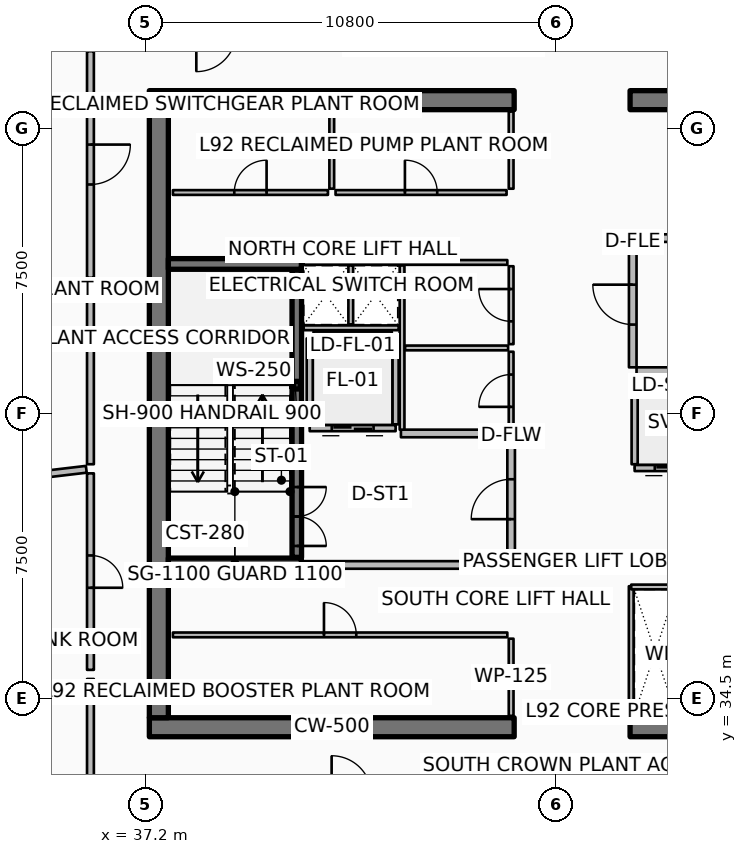
"""IFC4 building model, lengths in metres.
Left out: names, types, materials, properties, quantities, classifications, styles, units other than length and angle.
Written with IfcOpenShell. Run it as: python <this file> out.ifc"""

import sys

from ifc_helpers import new_model, si_unit, direction, frame, frame_2d, origin, origin_2d, place, context, subcontext, project, spatial, rectangle, hollow_rectangle, extrude, element, fill, save


model = new_model("IFC4")
c1 = context("Model", 3, precision=1e-05, world=origin(), true_north=direction((0.0, 1.0)))
c2 = subcontext(c1, "Body", "Model", "MODEL_VIEW")
j1 = project(units=[si_unit("LENGTHUNIT", "METRE"), si_unit("PLANEANGLEUNIT", "RADIAN")], contexts=[c1])
p1 = place(None, origin())
s1 = spatial("IfcSite", under=j1, at=p1, CompositionType="ELEMENT")
p2 = place(p1, origin())
s2 = spatial("IfcBuilding", under=s1, at=p2, CompositionType="ELEMENT")
p3 = place(p2, frame((0.0, 0.0, 366.8)))
s3 = spatial("IfcBuildingStorey", under=s2, at=p3, CompositionType="ELEMENT", Elevation=366.8)
p4 = place(p3, frame((37.3, 33.75, 0.0), z_axis=(0.0, 0.0, 1.0), x_axis=(1.0, 0.0, 0.0)))
e1 = element("IfcWall", 1, at=p4, inside=s3, PredefinedType="SHEAR", context=c2, shape_type="SweptSolid", body=[
    extrude(rectangle(XDim=9.6, YDim=0.5, at=frame_2d((4.8, 0.0))), origin(), (0.0, 0.0, 1.0), 3.6),
])
p5 = place(p3, frame((49.95, 33.75, 0.0), z_axis=(0.0, 0.0, 1.0), x_axis=(1.0, 0.0, 0.0)))
e2 = element("IfcWall", 2, at=p5, inside=s3, PredefinedType="SHEAR", context=c2, shape_type="SweptSolid", body=[
    extrude(rectangle(XDim=9.6, YDim=0.5, at=frame_2d((4.8, 0.0))), origin(), (0.0, 0.0, 1.0), 3.6),
])
p6 = place(p3, frame((37.3, 50.25, 0.0), z_axis=(0.0, 0.0, 1.0), x_axis=(1.0, 0.0, 0.0)))
e3 = element("IfcWall", 3, at=p6, inside=s3, PredefinedType="SHEAR", context=c2, shape_type="SweptSolid", body=[
    extrude(rectangle(XDim=9.6, YDim=0.5, at=frame_2d((4.8, 0.0))), origin(), (0.0, 0.0, 1.0), 3.6),
])
p7 = place(p3, frame((49.95, 50.25, 0.0), z_axis=(0.0, 0.0, 1.0), x_axis=(1.0, 0.0, 0.0)))
e4 = element("IfcWall", 4, at=p7, inside=s3, PredefinedType="SHEAR", context=c2, shape_type="SweptSolid", body=[
    extrude(rectangle(XDim=9.6, YDim=0.5, at=frame_2d((4.8, 0.0))), origin(), (0.0, 0.0, 1.0), 3.6),
])
p8 = place(p3, frame((37.55, 34.0, 0.0), z_axis=(0.0, 0.0, 1.0), x_axis=(0.0, 1.0, 0.0)))
e5 = element("IfcWall", 5, at=p8, inside=s3, PredefinedType="SHEAR", context=c2, shape_type="SweptSolid", body=[
    extrude(rectangle(XDim=16.0, YDim=0.5, at=frame_2d((8.0, 0.0))), origin(), (0.0, 0.0, 1.0), 3.6),
])
for number, where, z_axis, x_axis in (
    (6, (37.8, 38.06, 0.0), (0.0, 0.0, 1.0), (1.0, 0.0, 0.0)),
    (7, (37.8, 45.94, 0.0), (0.0, 0.0, 1.0), (1.0, 0.0, 0.0)),
):
    element("IfcWall", number, at=place(p3, frame(where, z_axis=z_axis, x_axis=x_axis)), inside=s3, PredefinedType="SHEAR", context=c2, shape_type="SweptSolid", body=[
        extrude(rectangle(XDim=3.5, YDim=0.28, at=frame_2d((1.75, 0.0))), origin(), (0.0, 0.0, 1.0), 3.6),
    ])
p9 = place(p3, frame((41.18, 42.75, 0.0), z_axis=(0.0, 0.0, 1.0), x_axis=(1.0, 0.0, 0.0)))
e8 = element("IfcColumn", 8, at=p9, inside=s3, PredefinedType="COLUMN", context=c2, shape_type="SweptSolid", body=[
    extrude(hollow_rectangle(XDim=0.2, YDim=0.2, WallThickness=0.01, InnerFilletRadius=0.01, OuterFilletRadius=0.02, at=origin_2d()), origin(), (0.0, 0.0, 1.0), 1.595),
])
p10 = place(p3, frame((41.18, 38.22, 0.0), z_axis=(0.0, 0.0, 1.0), x_axis=(0.0, 1.0, 0.0)))
e9 = element("IfcWall", 9, at=p10, inside=s3, PredefinedType="SOLIDWALL", context=c2, shape_type="SweptSolid", body=[
    extrude(rectangle(XDim=7.56, YDim=0.25, at=frame_2d((3.78, 0.0))), origin(), (0.0, 0.0, 1.0), 3.32),
])
p11 = place(p10, frame((0.3, 0.0, 0.0)))
e10 = element("IfcOpeningElement", 10, at=p11, cuts=e9, PredefinedType="OPENING", context=c2, shape_type="SweptSolid", body=[
    extrude(rectangle(XDim=1.55, YDim=2.15, at=frame_2d((0.775, 1.075))), frame((0.0, 0.135, 0.0), z_axis=(0.0, -1.0, 0.0), x_axis=(1.0, 0.0, 0.0)), (0.0, 0.0, 1.0), 0.27),
])
p12 = place(p3, frame((43.78, 41.62, 0.0), z_axis=(0.0, 0.0, 1.0), x_axis=(-1.0, 0.0, 0.0)))
e11 = element("IfcWall", 11, at=p12, inside=s3, PredefinedType="PARTITIONING", context=c2, shape_type="SweptSolid", body=[
    extrude(rectangle(XDim=2.26, YDim=0.16, at=frame_2d((1.13, 0.0))), origin(), (0.0, 0.0, 1.0), 3.32),
])
p13 = place(p12, frame((0.58, 0.0, 0.0)))
e12 = element("IfcOpeningElement", 12, at=p13, cuts=e11, PredefinedType="OPENING", context=c2, shape_type="SweptSolid", body=[
    extrude(rectangle(XDim=1.1, YDim=2.1, at=frame_2d((0.55, 1.05))), frame((0.0, 0.09, 0.0), z_axis=(0.0, -1.0, 0.0), x_axis=(1.0, 0.0, 0.0)), (0.0, 0.0, 1.0), 0.18),
])
for number, where, z_axis, x_axis in (
    (13, (43.78, 41.72, 0.0), (0.0, 0.0, 1.0), (0.0, 1.0, 0.0)),
    (14, (41.52, 41.72, 0.0), (0.0, 0.0, 1.0), (0.0, 1.0, 0.0)),
):
    element("IfcWall", number, at=place(p3, frame(where, z_axis=z_axis, x_axis=x_axis)), inside=s3, PredefinedType="PARTITIONING", context=c2, shape_type="SweptSolid", body=[
        extrude(rectangle(XDim=2.26, YDim=0.16, at=frame_2d((1.13, 0.0))), origin(), (0.0, 0.0, 1.0), 3.32),
    ])
p14 = place(p3, frame((41.62, 44.08, 0.0), z_axis=(0.0, 0.0, 1.0), x_axis=(1.0, 0.0, 0.0)))
e15 = element("IfcWall", 15, at=p14, inside=s3, PredefinedType="PARTITIONING", context=c2, shape_type="SweptSolid", body=[
    extrude(rectangle(XDim=2.06, YDim=0.16, at=frame_2d((1.03, 0.0))), origin(), (0.0, 0.0, 1.0), 3.32),
])
p15 = place(p3, frame((52.23, 40.57, 0.0), z_axis=(0.0, 0.0, 1.0), x_axis=(-1.0, 0.0, 0.0)))
e16 = element("IfcWall", 16, at=p15, inside=s3, PredefinedType="PARTITIONING", context=c2, shape_type="SweptSolid", body=[
    extrude(rectangle(XDim=2.16, YDim=0.16, at=frame_2d((1.08, 0.0))), origin(), (0.0, 0.0, 1.0), 3.32),
])
p16 = place(p15, frame((0.53, 0.0, 0.0)))
e17 = element("IfcOpeningElement", 17, at=p16, cuts=e16, PredefinedType="OPENING", context=c2, shape_type="SweptSolid", body=[
    extrude(rectangle(XDim=1.1, YDim=2.1, at=frame_2d((0.55, 1.05))), frame((0.0, 0.09, 0.0), z_axis=(0.0, -1.0, 0.0), x_axis=(1.0, 0.0, 0.0)), (0.0, 0.0, 1.0), 0.18),
])
p17 = place(p3, frame((50.07, 40.67, 0.0), z_axis=(0.0, 0.0, 1.0), x_axis=(0.0, 1.0, 0.0)))
e18 = element("IfcWall", 18, at=p17, inside=s3, PredefinedType="PARTITIONING", context=c2, shape_type="SweptSolid", body=[
    extrude(rectangle(XDim=2.16, YDim=0.16, at=frame_2d((1.08, 0.0))), origin(), (0.0, 0.0, 1.0), 3.32),
])
p18 = place(p3, frame((50.17, 42.93, 0.0), z_axis=(0.0, 0.0, 1.0), x_axis=(1.0, 0.0, 0.0)))
e19 = element("IfcWall", 19, at=p18, inside=s3, PredefinedType="PARTITIONING", context=c2, shape_type="SweptSolid", body=[
    extrude(rectangle(XDim=1.96, YDim=0.16, at=frame_2d((0.98, 0.0))), origin(), (0.0, 0.0, 1.0), 3.32),
])
p19 = place(p3, frame((46.82, 34.05, 0.0), z_axis=(0.0, 0.0, 1.0), x_axis=(0.0, 1.0, 0.0)))
e20 = element("IfcWall", 20, at=p19, inside=s3, PredefinedType="PARTITIONING", context=c2, shape_type="SweptSolid", body=[
    extrude(rectangle(XDim=2.03, YDim=0.125, at=frame_2d((1.015, 0.0))), origin(), (0.0, 0.0, 1.0), 2.76),
])
p20 = place(p3, frame((37.92, 36.18, 0.0), z_axis=(0.0, 0.0, 1.0), x_axis=(1.0, 0.0, 0.0)))
e21 = element("IfcWall", 21, at=p20, inside=s3, PredefinedType="PARTITIONING", context=c2, shape_type="SweptSolid", body=[
    extrude(rectangle(XDim=8.8, YDim=0.125, at=frame_2d((4.4, 0.0))), origin(), (0.0, 0.0, 1.0), 2.76),
])
p21 = place(p20, frame((3.975, 0.0, 0.0)))
e22 = element("IfcOpeningElement", 22, at=p21, cuts=e21, PredefinedType="OPENING", context=c2, shape_type="SweptSolid", body=[
    extrude(rectangle(XDim=0.85, YDim=2.06, at=frame_2d((0.425, 1.03))), frame((0.0, 0.073, 0.0), z_axis=(0.0, -1.0, 0.0), x_axis=(1.0, 0.0, 0.0)), (0.0, 0.0, 1.0), 0.145),
])
for number, where, z_axis, x_axis in (
    (23, (46.82, 47.92, 0.0), (0.0, 0.0, 1.0), (0.0, 1.0, 0.0)),
    (24, (42.1, 47.92, 0.0), (0.0, 0.0, 1.0), (0.0, 1.0, 0.0)),
):
    element("IfcWall", number, at=place(p3, frame(where, z_axis=z_axis, x_axis=x_axis)), inside=s3, PredefinedType="PARTITIONING", context=c2, shape_type="SweptSolid", body=[
        extrude(rectangle(XDim=2.03, YDim=0.125, at=frame_2d((1.015, 0.0))), origin(), (0.0, 0.0, 1.0), 2.76),
    ])
p22 = place(p3, frame((37.92, 47.82, 0.0), z_axis=(0.0, 0.0, 1.0), x_axis=(1.0, 0.0, 0.0)))
e25 = element("IfcWall", 25, at=p22, inside=s3, PredefinedType="PARTITIONING", context=c2, shape_type="SweptSolid", body=[
    extrude(rectangle(XDim=4.08, YDim=0.125, at=frame_2d((2.04, 0.0))), origin(), (0.0, 0.0, 1.0), 2.76),
])
p23 = place(p22, frame((1.615, 0.0, 0.0)))
e26 = element("IfcOpeningElement", 26, at=p23, cuts=e25, PredefinedType="OPENING", context=c2, shape_type="SweptSolid", body=[
    extrude(rectangle(XDim=0.85, YDim=2.06, at=frame_2d((0.425, 1.03))), frame((0.0, 0.073, 0.0), z_axis=(0.0, -1.0, 0.0), x_axis=(1.0, 0.0, 0.0)), (0.0, 0.0, 1.0), 0.145),
])
p24 = place(p3, frame((42.2, 47.82, 0.0), z_axis=(0.0, 0.0, 1.0), x_axis=(1.0, 0.0, 0.0)))
e27 = element("IfcWall", 27, at=p24, inside=s3, PredefinedType="PARTITIONING", context=c2, shape_type="SweptSolid", body=[
    extrude(rectangle(XDim=4.5, YDim=0.125, at=frame_2d((2.25, 0.0))), origin(), (0.0, 0.0, 1.0), 2.76),
])
p25 = place(p24, frame((1.825, 0.0, 0.0)))
e28 = element("IfcOpeningElement", 28, at=p25, cuts=e27, PredefinedType="OPENING", context=c2, shape_type="SweptSolid", body=[
    extrude(rectangle(XDim=0.85, YDim=2.06, at=frame_2d((0.425, 1.03))), frame((0.0, 0.073, 0.0), z_axis=(0.0, -1.0, 0.0), x_axis=(1.0, 0.0, 0.0)), (0.0, 0.0, 1.0), 0.145),
])
p26 = place(p3, frame((41.35, 38.02, 0.0), z_axis=(0.0, 0.0, 1.0), x_axis=(1.0, 0.0, 0.0)))
e29 = element("IfcWall", 29, at=p26, inside=s3, PredefinedType="PARTITIONING", context=c2, shape_type="SweptSolid", body=[
    extrude(rectangle(XDim=5.37, YDim=0.2, at=frame_2d((2.685, 0.0))), origin(), (0.0, 0.0, 1.0), 3.32),
])
p27 = place(p3, frame((43.92, 41.48, 0.0), z_axis=(0.0, 0.0, 1.0), x_axis=(1.0, 0.0, 0.0)))
e30 = element("IfcWall", 30, at=p27, inside=s3, PredefinedType="PARTITIONING", context=c2, shape_type="SweptSolid", body=[
    extrude(rectangle(XDim=2.8, YDim=0.2, at=frame_2d((1.4, 0.0))), origin(), (0.0, 0.0, 1.0), 3.32),
])
p28 = place(p3, frame((46.82, 38.12, 0.0), z_axis=(0.0, 0.0, 1.0), x_axis=(0.0, 1.0, 0.0)))
e31 = element("IfcWall", 31, at=p28, inside=s3, PredefinedType="PARTITIONING", context=c2, shape_type="SweptSolid", body=[
    extrude(rectangle(XDim=3.26, YDim=0.2, at=frame_2d((1.63, 0.0))), origin(), (0.0, 0.0, 1.0), 3.32),
])
p29 = place(p28, frame((1.105, 0.0, 0.0)))
e32 = element("IfcOpeningElement", 32, at=p29, cuts=e31, PredefinedType="OPENING", context=c2, shape_type="SweptSolid", body=[
    extrude(rectangle(XDim=1.05, YDim=2.1, at=frame_2d((0.525, 1.05))), frame((0.0, 0.11, 0.0), z_axis=(0.0, -1.0, 0.0), x_axis=(1.0, 0.0, 0.0)), (0.0, 0.0, 1.0), 0.22),
])
p30 = place(p3, frame((50.12, 43.12, 0.0), z_axis=(0.0, 0.0, 1.0), x_axis=(1.0, 0.0, 0.0)))
e33 = element("IfcWall", 33, at=p30, inside=s3, PredefinedType="PARTITIONING", context=c2, shape_type="SweptSolid", body=[
    extrude(rectangle(XDim=8.88, YDim=0.2, at=frame_2d((4.44, 0.0))), origin(), (0.0, 0.0, 1.0), 3.32),
])
p31 = place(p3, frame((50.14, 46.62, 0.0), z_axis=(0.0, 0.0, 1.0), x_axis=(1.0, 0.0, 0.0)))
e34 = element("IfcWall", 34, at=p31, inside=s3, PredefinedType="PARTITIONING", context=c2, shape_type="SweptSolid", body=[
    extrude(rectangle(XDim=1.02, YDim=0.2, at=frame_2d((0.51, 0.0))), origin(), (0.0, 0.0, 1.0), 3.32),
])
p32 = place(p3, frame((50.02, 43.22, 0.0), z_axis=(0.0, 0.0, 1.0), x_axis=(0.0, 1.0, 0.0)))
e35 = element("IfcWall", 35, at=p32, inside=s3, PredefinedType="PARTITIONING", context=c2, shape_type="SweptSolid", body=[
    extrude(rectangle(XDim=3.3, YDim=0.2, at=frame_2d((1.65, 0.0))), origin(), (0.0, 0.0, 1.0), 3.32),
])
p33 = place(p32, frame((1.125, 0.0, 0.0)))
e36 = element("IfcOpeningElement", 36, at=p33, cuts=e35, PredefinedType="OPENING", context=c2, shape_type="SweptSolid", body=[
    extrude(rectangle(XDim=1.05, YDim=2.1, at=frame_2d((0.525, 1.05))), frame((0.0, 0.11, 0.0), z_axis=(0.0, -1.0, 0.0), x_axis=(1.0, 0.0, 0.0)), (0.0, 0.0, 1.0), 0.22),
])
p34 = place(p3, frame((41.36, 45.98, 0.0), z_axis=(0.0, 0.0, 1.0), x_axis=(1.0, 0.0, 0.0)))
e37 = element("IfcWall", 37, at=p34, inside=s3, PredefinedType="PARTITIONING", context=c2, shape_type="SweptSolid", body=[
    extrude(rectangle(XDim=5.36, YDim=0.125, at=frame_2d((2.68, 0.0))), origin(), (0.0, 0.0, 1.0), 2.76),
])
p35 = place(p3, frame((41.36, 44.26, 0.0), z_axis=(0.0, 0.0, 1.0), x_axis=(1.0, 0.0, 0.0)))
e38 = element("IfcWall", 38, at=p35, inside=s3, PredefinedType="PARTITIONING", context=c2, shape_type="SweptSolid", body=[
    extrude(rectangle(XDim=2.5, YDim=0.125, at=frame_2d((1.25, 0.0))), origin(), (0.0, 0.0, 1.0), 2.76),
])
p36 = place(p3, frame((42.6, 44.35, 0.0), z_axis=(0.0, 0.0, 1.0), x_axis=(0.0, 1.0, 0.0)))
e39 = element("IfcWall", 39, at=p36, inside=s3, PredefinedType="PARTITIONING", context=c2, shape_type="SweptSolid", body=[
    extrude(rectangle(XDim=1.55, YDim=0.125, at=frame_2d((0.775, 0.0))), origin(), (0.0, 0.0, 1.0), 2.76),
])
p37 = place(p3, frame((49.98, 34.06, 0.0), z_axis=(0.0, 0.0, 1.0), x_axis=(0.0, 1.0, 0.0)))
e40 = element("IfcWall", 40, at=p37, inside=s3, PredefinedType="PARTITIONING", context=c2, shape_type="SweptSolid", body=[
    extrude(rectangle(XDim=3.4, YDim=0.125, at=frame_2d((1.7, 0.0))), origin(), (0.0, 0.0, 1.0), 2.76),
])
p38 = place(p3, frame((49.98, 37.44, 0.0), z_axis=(0.0, 0.0, 1.0), x_axis=(1.0, 0.0, 0.0)))
e41 = element("IfcWall", 41, at=p38, inside=s3, PredefinedType="PARTITIONING", context=c2, shape_type="SweptSolid", body=[
    extrude(rectangle(XDim=1.26, YDim=0.125, at=frame_2d((0.63, 0.0))), origin(), (0.0, 0.0, 1.0), 2.76),
])
p39 = place(p3, frame((43.95, 41.58, 0.0), z_axis=(0.0, 0.0, 1.0), x_axis=(0.0, 1.0, 0.0)))
e42 = element("IfcWall", 42, at=p39, inside=s3, PredefinedType="PARTITIONING", context=c2, shape_type="SweptSolid", body=[
    extrude(rectangle(XDim=4.32, YDim=0.125, at=frame_2d((2.16, 0.0))), origin(), (0.0, 0.0, 1.0), 2.76),
])
p40 = place(p3, frame((44.03, 43.73, 0.0), z_axis=(0.0, 0.0, 1.0), x_axis=(1.0, 0.0, 0.0)))
e43 = element("IfcWall", 43, at=p40, inside=s3, PredefinedType="PARTITIONING", context=c2, shape_type="SweptSolid", body=[
    extrude(rectangle(XDim=2.71, YDim=0.125, at=frame_2d((1.355, 0.0))), origin(), (0.0, 0.0, 1.0), 2.76),
])
p41 = place(p3, frame((46.82, 41.58, 0.0), z_axis=(0.0, 0.0, 1.0), x_axis=(0.0, 1.0, 0.0)))
e44 = element("IfcWall", 44, at=p41, inside=s3, PredefinedType="PARTITIONING", context=c2, shape_type="SweptSolid", body=[
    extrude(rectangle(XDim=2.05, YDim=0.125, at=frame_2d((1.025, 0.0))), origin(), (0.0, 0.0, 1.0), 2.76),
])
p42 = place(p41, frame((0.6, 0.0, 0.0)))
e45 = element("IfcOpeningElement", 45, at=p42, cuts=e44, PredefinedType="OPENING", context=c2, shape_type="SweptSolid", body=[
    extrude(rectangle(XDim=0.85, YDim=2.06, at=frame_2d((0.425, 1.03))), frame((0.0, 0.073, 0.0), z_axis=(0.0, -1.0, 0.0), x_axis=(1.0, 0.0, 0.0)), (0.0, 0.0, 1.0), 0.145),
])
p43 = place(p3, frame((46.82, 43.83, 0.0), z_axis=(0.0, 0.0, 1.0), x_axis=(0.0, 1.0, 0.0)))
e46 = element("IfcWall", 46, at=p43, inside=s3, PredefinedType="PARTITIONING", context=c2, shape_type="SweptSolid", body=[
    extrude(rectangle(XDim=2.05, YDim=0.125, at=frame_2d((1.025, 0.0))), origin(), (0.0, 0.0, 1.0), 2.76),
])
p44 = place(p43, frame((0.6, 0.0, 0.0)))
e47 = element("IfcOpeningElement", 47, at=p44, cuts=e46, PredefinedType="OPENING", context=c2, shape_type="SweptSolid", body=[
    extrude(rectangle(XDim=0.85, YDim=2.06, at=frame_2d((0.425, 1.03))), frame((0.0, 0.073, 0.0), z_axis=(0.0, -1.0, 0.0), x_axis=(1.0, 0.0, 0.0)), (0.0, 0.0, 1.0), 0.145),
])
p45 = place(p3, frame((35.75, 51.537, 0.0), z_axis=(0.0, 0.0, 1.0), x_axis=(0.0, -1.0, 0.0)))
e48 = element("IfcWall", 48, at=p45, inside=s3, PredefinedType="PARTITIONING", context=c2, shape_type="SweptSolid", body=[
    extrude(rectangle(XDim=5.962, YDim=0.18, at=frame_2d((2.981, 0.0))), origin(), (0.0, 0.0, 1.0), 2.76),
])
p46 = place(p45, frame((2.456, 0.0, 0.0)))
e49 = element("IfcOpeningElement", 49, at=p46, cuts=e48, PredefinedType="OPENING", context=c2, shape_type="SweptSolid", body=[
    extrude(rectangle(XDim=1.05, YDim=2.1, at=frame_2d((0.525, 1.05))), frame((0.0, 0.1, 0.0), z_axis=(0.0, -1.0, 0.0), x_axis=(1.0, 0.0, 0.0)), (0.0, 0.0, 1.0), 0.2),
])
p47 = place(p3, frame((35.75, 45.335, 0.0), z_axis=(0.0, 0.0, 1.0), x_axis=(0.0, -1.0, 0.0)))
e50 = element("IfcWall", 50, at=p47, inside=s3, PredefinedType="PARTITIONING", context=c2, shape_type="SweptSolid", body=[
    extrude(rectangle(XDim=4.665, YDim=0.18, at=frame_2d((2.333, 0.0))), origin(), (0.0, 0.0, 1.0), 2.76),
])
p48 = place(p3, frame((35.641, 40.537, 0.0), z_axis=(0.0, 0.0, 1.0), x_axis=(-0.993070751419, -0.117518010011, 0.0)))
e51 = element("IfcWall", 51, at=p48, inside=s3, PredefinedType="PARTITIONING", context=c2, shape_type="SweptSolid", body=[
    extrude(rectangle(XDim=8.686, YDim=0.18, at=frame_2d((4.343, 0.0))), origin(), (0.0, 0.0, 1.0), 2.76),
])
p49 = place(p3, frame((35.75, 40.43, 0.0), z_axis=(0.0, 0.0, 1.0), x_axis=(0.0, -1.0, 0.0)))
e52 = element("IfcWall", 52, at=p49, inside=s3, PredefinedType="PARTITIONING", context=c2, shape_type="SweptSolid", body=[
    extrude(rectangle(XDim=5.17, YDim=0.18, at=frame_2d((2.585, 0.0))), origin(), (0.0, 0.0, 1.0), 2.76),
])
p50 = place(p49, frame((2.16, 0.0, 0.0)))
e53 = element("IfcOpeningElement", 53, at=p50, cuts=e52, PredefinedType="OPENING", context=c2, shape_type="SweptSolid", body=[
    extrude(rectangle(XDim=0.85, YDim=2.06, at=frame_2d((0.425, 1.03))), frame((0.0, 0.1, 0.0), z_axis=(0.0, -1.0, 0.0), x_axis=(1.0, 0.0, 0.0)), (0.0, 0.0, 1.0), 0.2),
])
p51 = place(p3, frame((35.75, 35.02, 0.0), z_axis=(0.0, 0.0, 1.0), x_axis=(0.0, -1.0, 0.0)))
e54 = element("IfcWall", 54, at=p51, inside=s3, PredefinedType="PARTITIONING", context=c2, shape_type="SweptSolid", body=[
    extrude(rectangle(XDim=2.95, YDim=0.18, at=frame_2d((1.475, 0.0))), origin(), (0.0, 0.0, 1.0), 2.76),
])
p52 = place(p11, origin())
e55 = element("IfcDoor", 55, at=p52, inside=s3, OperationType="DOUBLE_DOOR_SINGLE_SWING", PredefinedType="DOOR", context=c2, shape_type="SweptSolid", body=[
    extrude(rectangle(XDim=1.55, YDim=2.15, at=frame_2d((0.775, 1.075))), frame((0.0, 0.025, 0.0), z_axis=(0.0, -1.0, 0.0), x_axis=(1.0, 0.0, 0.0)), (0.0, 0.0, 1.0), 0.05),
])
fill(e10, e55)
p53 = place(p13, origin())
e56 = element("IfcDoor", 56, at=p53, inside=s3, OperationType="DOUBLE_DOOR_SLIDING", PredefinedType="DOOR", context=c2, shape_type="SweptSolid", body=[
    extrude(rectangle(XDim=1.1, YDim=2.1, at=frame_2d((0.55, 1.05))), frame((0.0, 0.025, 0.0), z_axis=(0.0, -1.0, 0.0), x_axis=(1.0, 0.0, 0.0)), (0.0, 0.0, 1.0), 0.05),
])
fill(e12, e56)
p54 = place(p16, origin())
e57 = element("IfcDoor", 57, at=p54, inside=s3, OperationType="DOUBLE_DOOR_SLIDING", PredefinedType="DOOR", context=c2, shape_type="SweptSolid", body=[
    extrude(rectangle(XDim=1.1, YDim=2.1, at=frame_2d((0.55, 1.05))), frame((0.0, 0.025, 0.0), z_axis=(0.0, -1.0, 0.0), x_axis=(1.0, 0.0, 0.0)), (0.0, 0.0, 1.0), 0.05),
])
fill(e17, e57)
p55 = place(p21, origin())
e58 = element("IfcDoor", 58, at=p55, inside=s3, OperationType="SINGLE_SWING_LEFT", PredefinedType="DOOR", context=c2, shape_type="SweptSolid", body=[
    extrude(rectangle(XDim=0.85, YDim=2.06, at=frame_2d((0.425, 1.03))), frame((0.0, 0.025, 0.0), z_axis=(0.0, -1.0, 0.0), x_axis=(1.0, 0.0, 0.0)), (0.0, 0.0, 1.0), 0.05),
])
fill(e22, e58)
p56 = place(p23, origin())
e59 = element("IfcDoor", 59, at=p56, inside=s3, OperationType="SINGLE_SWING_RIGHT", PredefinedType="DOOR", context=c2, shape_type="SweptSolid", body=[
    extrude(rectangle(XDim=0.85, YDim=2.06, at=frame_2d((0.425, 1.03))), frame((0.0, 0.025, 0.0), z_axis=(0.0, -1.0, 0.0), x_axis=(1.0, 0.0, 0.0)), (0.0, 0.0, 1.0), 0.05),
])
fill(e26, e59)
p57 = place(p25, origin())
e60 = element("IfcDoor", 60, at=p57, inside=s3, OperationType="SINGLE_SWING_LEFT", PredefinedType="DOOR", context=c2, shape_type="SweptSolid", body=[
    extrude(rectangle(XDim=0.85, YDim=2.06, at=frame_2d((0.425, 1.03))), frame((0.0, 0.025, 0.0), z_axis=(0.0, -1.0, 0.0), x_axis=(1.0, 0.0, 0.0)), (0.0, 0.0, 1.0), 0.05),
])
fill(e28, e60)
p58 = place(p29, origin())
e61 = element("IfcDoor", 61, at=p58, inside=s3, OperationType="SINGLE_SWING_LEFT", PredefinedType="DOOR", context=c2, shape_type="SweptSolid", body=[
    extrude(rectangle(XDim=1.05, YDim=2.1, at=frame_2d((0.525, 1.05))), frame((0.0, 0.025, 0.0), z_axis=(0.0, -1.0, 0.0), x_axis=(1.0, 0.0, 0.0)), (0.0, 0.0, 1.0), 0.05),
])
fill(e32, e61)
p59 = place(p33, origin())
e62 = element("IfcDoor", 62, at=p59, inside=s3, OperationType="SINGLE_SWING_RIGHT", PredefinedType="DOOR", context=c2, shape_type="SweptSolid", body=[
    extrude(rectangle(XDim=1.05, YDim=2.1, at=frame_2d((0.525, 1.05))), frame((0.0, 0.025, 0.0), z_axis=(0.0, -1.0, 0.0), x_axis=(1.0, 0.0, 0.0)), (0.0, 0.0, 1.0), 0.05),
])
fill(e36, e62)
p60 = place(p42, origin())
e63 = element("IfcDoor", 63, at=p60, inside=s3, OperationType="SINGLE_SWING_LEFT", PredefinedType="DOOR", context=c2, shape_type="SweptSolid", body=[
    extrude(rectangle(XDim=0.85, YDim=2.06, at=frame_2d((0.425, 1.03))), frame((0.0, 0.025, 0.0), z_axis=(0.0, -1.0, 0.0), x_axis=(1.0, 0.0, 0.0)), (0.0, 0.0, 1.0), 0.05),
])
fill(e45, e63)
p61 = place(p44, origin())
e64 = element("IfcDoor", 64, at=p61, inside=s3, OperationType="SINGLE_SWING_RIGHT", PredefinedType="DOOR", context=c2, shape_type="SweptSolid", body=[
    extrude(rectangle(XDim=0.85, YDim=2.06, at=frame_2d((0.425, 1.03))), frame((0.0, 0.025, 0.0), z_axis=(0.0, -1.0, 0.0), x_axis=(1.0, 0.0, 0.0)), (0.0, 0.0, 1.0), 0.05),
])
fill(e47, e64)
p62 = place(p46, origin())
e65 = element("IfcDoor", 65, at=p62, inside=s3, OperationType="SINGLE_SWING_LEFT", PredefinedType="DOOR", context=c2, shape_type="SweptSolid", body=[
    extrude(rectangle(XDim=1.05, YDim=2.1, at=frame_2d((0.525, 1.05))), frame((0.0, 0.025, 0.0), z_axis=(0.0, -1.0, 0.0), x_axis=(1.0, 0.0, 0.0)), (0.0, 0.0, 1.0), 0.05),
])
fill(e49, e65)
p63 = place(p50, origin())
e66 = element("IfcDoor", 66, at=p63, inside=s3, OperationType="SINGLE_SWING_RIGHT", PredefinedType="DOOR", context=c2, shape_type="SweptSolid", body=[
    extrude(rectangle(XDim=0.85, YDim=2.06, at=frame_2d((0.425, 1.03))), frame((0.0, 0.025, 0.0), z_axis=(0.0, -1.0, 0.0), x_axis=(1.0, 0.0, 0.0)), (0.0, 0.0, 1.0), 0.05),
])
fill(e53, e66)
save(model, sys.argv[1])
